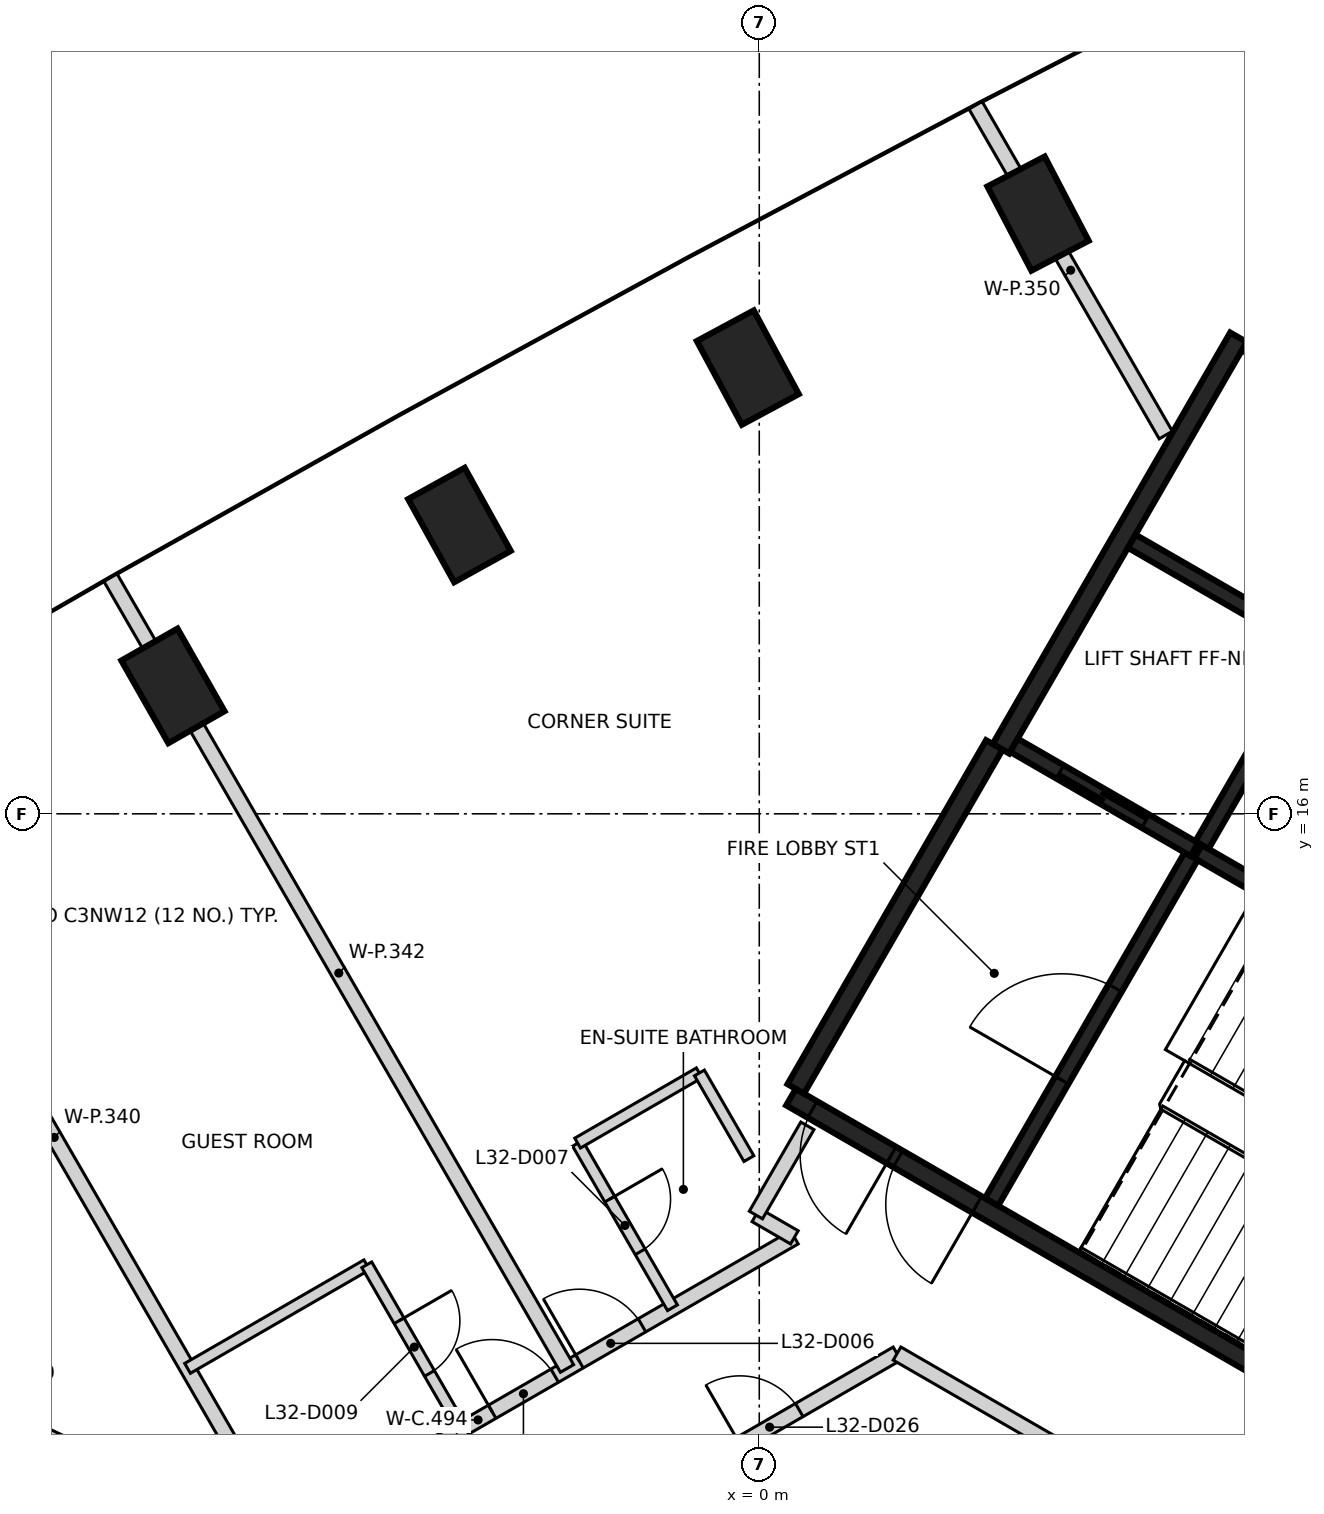
"""IFC4 building model, lengths in metres.
Left out: names, types, materials, properties, quantities, classifications, styles, units other than length and angle.
Written with IfcOpenShell. Run it as: python <this file> out.ifc"""

import sys

from ifc_helpers import new_model, si_unit, direction, frame, frame_2d, origin, origin_2d, place, context, subcontext, project, spatial, rectangle, extrude, element, fill, save


model = new_model("IFC4")
c1 = context("Model", 3, precision=1e-05, world=origin(), true_north=direction((0.0, 1.0)))
c2 = subcontext(c1, "Body", "Model", "MODEL_VIEW")
j1 = project(units=[si_unit("LENGTHUNIT", "METRE"), si_unit("PLANEANGLEUNIT", "RADIAN")], contexts=[c1])
p1 = place(None, origin())
s1 = spatial("IfcSite", under=j1, at=p1, CompositionType="ELEMENT")
p2 = place(p1, origin())
s2 = spatial("IfcBuilding", under=s1, at=p2, CompositionType="ELEMENT")
p3 = place(p2, frame((0.0, 0.0, 132.4)))
s3 = spatial("IfcBuildingStorey", under=s2, at=p3, CompositionType="ELEMENT", Elevation=132.4)
for number, where, z_axis, x_axis in (
    (1, (3.667, 23.896, -0.4), (0.0, 0.0, 1.0), (-0.463, 0.886, 0.0)),
    (2, (-0.151, 21.871, -0.4), (0.0, 0.0, 1.0), (-0.474, 0.881, 0.0)),
    (3, (-3.945, 19.8, -0.4), (0.0, 0.0, 1.0), (-0.485, 0.875, 0.0)),
    (4, (-7.714, 17.683, -0.4), (0.0, 0.0, 1.0), (-0.495, 0.869, 0.0)),
):
    element("IfcColumn", number, at=place(p3, frame(where, z_axis=z_axis, x_axis=x_axis)), inside=s3, PredefinedType="COLUMN", context=c2, shape_type="SweptSolid", body=[
        extrude(rectangle(XDim=1.25, YDim=0.85, at=origin_2d()), origin(), (0.0, 0.0, 1.0), 3.6),
    ])
p4 = place(p3, frame((10.42, 6.498, 0.0), z_axis=(0.0, 0.0, 1.0), x_axis=(-0.866021906294, 0.500006057782, 0.0)))
e5 = element("IfcWall", 5, at=p4, inside=s3, PredefinedType="SHEAR", context=c2, shape_type="SweptSolid", body=[
    extrude(rectangle(XDim=11.55, YDim=0.25, at=frame_2d((5.775, 0.0))), origin(), (0.0, 0.0, 1.0), 3.2),
])
p5 = place(p4, frame((10.025, 0.0, 0.0)))
e6 = element("IfcOpeningElement", 6, at=p5, cuts=e5, PredefinedType="OPENING", context=c2, shape_type="SweptSolid", body=[
    extrude(rectangle(XDim=1.2, YDim=2.1, at=frame_2d((0.6, 1.05))), frame((0.0, 0.135, 0.0), z_axis=(0.0, -1.0, 0.0), x_axis=(1.0, 0.0, 0.0)), (0.0, 0.0, 1.0), 0.27),
])
p6 = place(p4, frame((8.725, 0.0, 0.0)))
e7 = element("IfcOpeningElement", 7, at=p6, cuts=e5, PredefinedType="OPENING", context=c2, shape_type="SweptSolid", body=[
    extrude(rectangle(XDim=1.2, YDim=2.1, at=frame_2d((0.6, 1.05))), frame((0.0, 0.135, 0.0), z_axis=(0.0, -1.0, 0.0), x_axis=(1.0, 0.0, 0.0)), (0.0, 0.0, 1.0), 0.27),
])
p7 = place(p3, frame((3.179, 16.856, 0.0), z_axis=(0.0, 0.0, 1.0), x_axis=(0.500004234368, 0.866022959057, 0.0)))
e8 = element("IfcWall", 8, at=p7, inside=s3, PredefinedType="SHEAR", context=c2, shape_type="SweptSolid", body=[
    extrude(rectangle(XDim=6.25, YDim=0.25, at=frame_2d((3.125, 0.0))), origin(), (0.0, 0.0, 1.0), 3.2),
])
p8 = place(p3, frame((0.48, 12.381, 0.0), z_axis=(0.0, 0.0, 1.0), x_axis=(0.49999885962, 0.866026062182, 0.0)))
e9 = element("IfcWall", 9, at=p8, inside=s3, PredefinedType="SHEAR", context=c2, shape_type="SweptSolid", body=[
    extrude(rectangle(XDim=5.225, YDim=0.25, at=frame_2d((2.612, 0.0))), origin(), (0.0, 0.0, 1.0), 3.2),
])
p9 = place(p3, frame((6.413, 22.206, 0.0), z_axis=(0.0, 0.0, 1.0), x_axis=(0.866016279763, -0.500015802937, 0.0)))
e10 = element("IfcWall", 10, at=p9, inside=s3, PredefinedType="SHEAR", context=c2, shape_type="SweptSolid", body=[
    extrude(rectangle(XDim=1.849, YDim=0.25, at=frame_2d((0.925, 0.0))), origin(), (0.0, 0.0, 1.0), 3.2),
])
p10 = place(p3, frame((5.775, 15.502, 0.0), z_axis=(0.0, 0.0, 1.0), x_axis=(0.866020080793, -0.500009219579, 0.0)))
e11 = element("IfcWall", 11, at=p10, inside=s3, PredefinedType="SHEAR", context=c2, shape_type="SweptSolid", body=[
    extrude(rectangle(XDim=5.699, YDim=0.2, at=frame_2d((2.85, 0.0))), origin(), (0.0, 0.0, 1.0), 3.2),
])
p11 = place(p3, frame((3.057, 10.895, 0.0), z_axis=(0.0, 0.0, 1.0), x_axis=(0.499989418164, 0.866031513124, 0.0)))
e12 = element("IfcWall", 12, at=p11, inside=s3, PredefinedType="SHEAR", context=c2, shape_type="SweptSolid", body=[
    extrude(rectangle(XDim=5.251, YDim=0.2, at=frame_2d((2.625, 0.0))), origin(), (0.0, 0.0, 1.0), 3.2),
])
p12 = place(p11, frame((1.849, 0.0, 0.0)))
e13 = element("IfcOpeningElement", 13, at=p12, cuts=e12, PredefinedType="OPENING", context=c2, shape_type="SweptSolid", body=[
    extrude(rectangle(XDim=1.4, YDim=2.1, at=frame_2d((0.7, 1.05))), frame((0.0, 0.11, 0.0), z_axis=(0.0, -1.0, 0.0), x_axis=(1.0, 0.0, 0.0)), (0.0, 0.0, 1.0), 0.22),
])
p13 = place(p3, frame((7.199, 17.97, 0.0), z_axis=(0.0, 0.0, 1.0), x_axis=(-0.499968400327, -0.866043647095, 0.0)))
e14 = element("IfcWall", 14, at=p13, inside=s3, PredefinedType="SHEAR", context=c2, shape_type="SweptSolid", body=[
    extrude(rectangle(XDim=2.75, YDim=0.2, at=frame_2d((1.375, 0.0))), origin(), (0.0, 0.0, 1.0), 3.2),
])
p14 = place(p3, frame((5.725, 15.531, 0.0), z_axis=(0.0, 0.0, 1.0), x_axis=(-0.866037306777, 0.499979382845, 0.0)))
e15 = element("IfcWall", 15, at=p14, inside=s3, PredefinedType="SHEAR", context=c2, shape_type="SweptSolid", body=[
    extrude(rectangle(XDim=2.742, YDim=0.2, at=frame_2d((1.371, 0.0))), origin(), (0.0, 0.0, 1.0), 3.2),
])
p15 = place(p14, frame((0.743, 0.0, 0.0)))
e16 = element("IfcOpeningElement", 16, at=p15, cuts=e15, PredefinedType="OPENING", context=c2, shape_type="SweptSolid", body=[
    extrude(rectangle(XDim=1.3, YDim=2.1, at=frame_2d((0.65, 1.05))), frame((0.0, 0.11, 0.0), z_axis=(0.0, -1.0, 0.0), x_axis=(1.0, 0.0, 0.0)), (0.0, 0.0, 1.0), 0.22),
])
p16 = place(p3, frame((4.901, 19.586, 0.0), z_axis=(0.0, 0.0, 1.0), x_axis=(0.866022890907, -0.500004352405, 0.0)))
e17 = element("IfcWall", 17, at=p16, inside=s3, PredefinedType="SHEAR", context=c2, shape_type="SweptSolid", body=[
    extrude(rectangle(XDim=2.799, YDim=0.2, at=frame_2d((1.399, 0.0))), origin(), (0.0, 0.0, 1.0), 3.2),
])
p17 = place(p3, frame((-10.141, 8.176, 0.0), z_axis=(0.0, 0.0, 1.0), x_axis=(0.903904169039, -0.427735026849, 0.0)))
e18 = element("IfcWall", 18, at=p17, inside=s3, PredefinedType="PARTITIONING", context=c2, shape_type="SweptSolid", body=[
    extrude(rectangle(XDim=1.225, YDim=0.2, at=frame_2d((0.612, 0.0))), origin(), (0.0, 0.0, 1.0), 3.2),
])
p18 = place(p3, frame((-8.613, 2.881, 0.0), z_axis=(0.0, 0.0, 1.0), x_axis=(0.866103179807, 0.499865263774, 0.0)))
e19 = element("IfcWall", 19, at=p18, inside=s3, PredefinedType="PARTITIONING", context=c2, shape_type="SweptSolid", body=[
    extrude(rectangle(XDim=12.036, YDim=0.2, at=frame_2d((6.018, 0.0))), origin(), (0.0, 0.0, 1.0), 3.2),
])
p19 = place(p18, frame((9.652, 0.0, 0.0)))
e20 = element("IfcOpeningElement", 20, at=p19, cuts=e19, PredefinedType="OPENING", context=c2, shape_type="SweptSolid", body=[
    extrude(rectangle(XDim=0.9, YDim=2.1, at=frame_2d((0.45, 1.05))), frame((0.0, 0.11, 0.0), z_axis=(0.0, -1.0, 0.0), x_axis=(1.0, 0.0, 0.0)), (0.0, 0.0, 1.0), 0.22),
])
p20 = place(p18, frame((3.646, 0.0, 0.0)))
e21 = element("IfcOpeningElement", 21, at=p20, cuts=e19, PredefinedType="OPENING", context=c2, shape_type="SweptSolid", body=[
    extrude(rectangle(XDim=0.9, YDim=2.1, at=frame_2d((0.45, 1.05))), frame((0.0, 0.11, 0.0), z_axis=(0.0, -1.0, 0.0), x_axis=(1.0, 0.0, 0.0)), (0.0, 0.0, 1.0), 0.22),
])
p21 = place(p3, frame((-7.862, 5.624, 0.0), z_axis=(0.0, 0.0, 1.0), x_axis=(0.866109024618, 0.499855136491, 0.0)))
e22 = element("IfcWall", 22, at=p21, inside=s3, PredefinedType="PARTITIONING", context=c2, shape_type="SweptSolid", body=[
    extrude(rectangle(XDim=9.61, YDim=0.2, at=frame_2d((4.805, 0.0))), origin(), (0.0, 0.0, 1.0), 3.2),
])
p22 = place(p21, frame((6.345, 0.0, 0.0)))
e23 = element("IfcOpeningElement", 23, at=p22, cuts=e22, PredefinedType="OPENING", context=c2, shape_type="SweptSolid", body=[
    extrude(rectangle(XDim=0.95, YDim=2.1, at=frame_2d((0.475, 1.05))), frame((0.0, 0.11, 0.0), z_axis=(0.0, -1.0, 0.0), x_axis=(1.0, 0.0, 0.0)), (0.0, 0.0, 1.0), 0.22),
])
p23 = place(p21, frame((5.02, 0.0, 0.0)))
e24 = element("IfcOpeningElement", 24, at=p23, cuts=e22, PredefinedType="OPENING", context=c2, shape_type="SweptSolid", body=[
    extrude(rectangle(XDim=0.95, YDim=2.1, at=frame_2d((0.475, 1.05))), frame((0.0, 0.11, 0.0), z_axis=(0.0, -1.0, 0.0), x_axis=(1.0, 0.0, 0.0)), (0.0, 0.0, 1.0), 0.22),
])
p24 = place(p3, frame((-0.045, 10.721, 0.0), z_axis=(0.0, 0.0, 1.0), x_axis=(0.865768710998, -0.500444341617, 0.0)))
e25 = element("IfcWall", 25, at=p24, inside=s3, PredefinedType="PARTITIONING", context=c2, shape_type="SweptSolid", body=[
    extrude(rectangle(XDim=0.585, YDim=0.2, at=frame_2d((0.293, 0.0))), origin(), (0.0, 0.0, 1.0), 3.2),
])
p25 = place(p3, frame((-0.044, 10.722, 0.0), z_axis=(0.0, 0.0, 1.0), x_axis=(0.500034408226, 0.866005537274, 0.0)))
e26 = element("IfcWall", 26, at=p25, inside=s3, PredefinedType="PARTITIONING", context=c2, shape_type="SweptSolid", body=[
    extrude(rectangle(XDim=1.355, YDim=0.2, at=frame_2d((0.677, 0.0))), origin(), (0.0, 0.0, 1.0), 3.2),
])
p26 = place(p3, frame((1.813, 8.899, 0.0), z_axis=(0.0, 0.0, 1.0), x_axis=(0.865957732194, -0.50011719232, 0.0)))
e27 = element("IfcWall", 27, at=p26, inside=s3, PredefinedType="PARTITIONING", context=c2, shape_type="SweptSolid", body=[
    extrude(rectangle(XDim=2.891, YDim=0.2, at=frame_2d((1.445, 0.0))), origin(), (0.0, 0.0, 1.0), 2.3),
])
p27 = place(p3, frame((-12.279, 16.946, 0.0), z_axis=(0.0, 0.0, 1.0), x_axis=(0.499902454835, -0.866081714187, 0.0)))
e28 = element("IfcWall", 28, at=p27, inside=s3, PredefinedType="PARTITIONING", context=c2, shape_type="SweptSolid", body=[
    extrude(rectangle(XDim=12.015, YDim=0.2, at=frame_2d((6.008, 0.0))), origin(), (0.0, 0.0, 1.0), 3.2),
])
p28 = place(p3, frame((-8.535, 19.107, 0.0), z_axis=(0.0, 0.0, 1.0), x_axis=(0.499972843048, -0.86604108229, 0.0)))
e29 = element("IfcWall", 29, at=p28, inside=s3, PredefinedType="PARTITIONING", context=c2, shape_type="SweptSolid", body=[
    extrude(rectangle(XDim=12.013, YDim=0.2, at=frame_2d((6.007, 0.0))), origin(), (0.0, 0.0, 1.0), 3.2),
])
p29 = place(p3, frame((2.845, 25.321, 0.0), z_axis=(0.0, 0.0, 1.0), x_axis=(0.499730893997, -0.86618071647, 0.0)))
e30 = element("IfcWall", 30, at=p29, inside=s3, PredefinedType="PARTITIONING", context=c2, shape_type="SweptSolid", body=[
    extrude(rectangle(XDim=5.008, YDim=0.2, at=frame_2d((2.504, 0.0))), origin(), (0.0, 0.0, 1.0), 3.2),
])
p30 = place(p3, frame((-7.522, 8.704, 0.0), z_axis=(0.0, 0.0, 1.0), x_axis=(0.865972067821, 0.500092369221, 0.0)))
e31 = element("IfcWall", 31, at=p30, inside=s3, PredefinedType="PARTITIONING", context=c2, shape_type="SweptSolid", body=[
    extrude(rectangle(XDim=2.723, YDim=0.15, at=frame_2d((1.362, 0.0))), origin(), (0.0, 0.0, 1.0), 3.2),
])
p31 = place(p3, frame((-5.164, 10.067, 0.0), z_axis=(0.0, 0.0, 1.0), x_axis=(0.500046524342, -0.865998541277, 0.0)))
e32 = element("IfcWall", 32, at=p31, inside=s3, PredefinedType="PARTITIONING", context=c2, shape_type="SweptSolid", body=[
    extrude(rectangle(XDim=2.5, YDim=0.15, at=frame_2d((1.25, 0.0))), origin(), (0.0, 0.0, 1.0), 3.2),
])
p32 = place(p31, frame((0.85, 0.0, 0.0)))
e33 = element("IfcOpeningElement", 33, at=p32, cuts=e32, PredefinedType="OPENING", context=c2, shape_type="SweptSolid", body=[
    extrude(rectangle(XDim=0.8, YDim=2.1, at=frame_2d((0.4, 1.05))), frame((0.0, 0.085, 0.0), z_axis=(0.0, -1.0, 0.0), x_axis=(1.0, 0.0, 0.0)), (0.0, 0.0, 1.0), 0.17),
])
p33 = place(p3, frame((-2.391, 11.665, 0.0), z_axis=(0.0, 0.0, 1.0), x_axis=(0.500049599607, -0.865996765544, 0.0)))
e34 = element("IfcWall", 34, at=p33, inside=s3, PredefinedType="PARTITIONING", context=c2, shape_type="SweptSolid", body=[
    extrude(rectangle(XDim=2.498, YDim=0.15, at=frame_2d((1.249, 0.0))), origin(), (0.0, 0.0, 1.0), 3.2),
])
p34 = place(p33, frame((0.848, 0.0, 0.0)))
e35 = element("IfcOpeningElement", 35, at=p34, cuts=e34, PredefinedType="OPENING", context=c2, shape_type="SweptSolid", body=[
    extrude(rectangle(XDim=0.8, YDim=2.1, at=frame_2d((0.4, 1.05))), frame((0.0, 0.085, 0.0), z_axis=(0.0, -1.0, 0.0), x_axis=(1.0, 0.0, 0.0)), (0.0, 0.0, 1.0), 0.17),
])
p35 = place(p3, frame((-2.39, 11.668, 0.0), z_axis=(0.0, 0.0, 1.0), x_axis=(0.865932482239, 0.500160910312, 0.0)))
e36 = element("IfcWall", 36, at=p35, inside=s3, PredefinedType="PARTITIONING", context=c2, shape_type="SweptSolid", body=[
    extrude(rectangle(XDim=1.848, YDim=0.15, at=frame_2d((0.924, 0.0))), origin(), (0.0, 0.0, 1.0), 3.2),
])
p36 = place(p3, frame((-0.787, 12.591, 0.0), z_axis=(0.0, 0.0, 1.0), x_axis=(0.499749509877, -0.866169976031, 0.0)))
e37 = element("IfcWall", 37, at=p36, inside=s3, PredefinedType="PARTITIONING", context=c2, shape_type="SweptSolid", body=[
    extrude(rectangle(XDim=1.302, YDim=0.15, at=frame_2d((0.651, 0.0))), origin(), (0.0, 0.0, 1.0), 3.2),
])
p37 = place(p15, origin())
e38 = element("IfcDoor", 38, at=p37, inside=s3, OperationType="SLIDING_TO_RIGHT", PredefinedType="DOOR", context=c2, shape_type="SweptSolid", body=[
    extrude(rectangle(XDim=1.3, YDim=2.1, at=frame_2d((0.65, 1.05))), frame((0.0, 0.025, 0.0), z_axis=(0.0, -1.0, 0.0), x_axis=(1.0, 0.0, 0.0)), (0.0, 0.0, 1.0), 0.05),
])
fill(e16, e38)
p38 = place(p5, origin())
e39 = element("IfcDoor", 39, at=p38, inside=s3, OperationType="SINGLE_SWING_LEFT", PredefinedType="DOOR", context=c2, shape_type="SweptSolid", body=[
    extrude(rectangle(XDim=1.2, YDim=2.1, at=frame_2d((0.6, 1.05))), frame((0.0, 0.025, 0.0), z_axis=(0.0, -1.0, 0.0), x_axis=(1.0, 0.0, 0.0)), (0.0, 0.0, 1.0), 0.05),
])
fill(e6, e39)
p39 = place(p6, origin())
e40 = element("IfcDoor", 40, at=p39, inside=s3, OperationType="SINGLE_SWING_RIGHT", PredefinedType="DOOR", context=c2, shape_type="SweptSolid", body=[
    extrude(rectangle(XDim=1.2, YDim=2.1, at=frame_2d((0.6, 1.05))), frame((0.0, 0.025, 0.0), z_axis=(0.0, -1.0, 0.0), x_axis=(1.0, 0.0, 0.0)), (0.0, 0.0, 1.0), 0.05),
])
fill(e7, e40)
p40 = place(p12, origin())
e41 = element("IfcDoor", 41, at=p40, inside=s3, OperationType="SINGLE_SWING_RIGHT", PredefinedType="DOOR", context=c2, shape_type="SweptSolid", body=[
    extrude(rectangle(XDim=1.4, YDim=2.1, at=frame_2d((0.7, 1.05))), frame((0.0, 0.025, 0.0), z_axis=(0.0, -1.0, 0.0), x_axis=(1.0, 0.0, 0.0)), (0.0, 0.0, 1.0), 0.05),
])
fill(e13, e41)
p41 = place(p22, origin())
e42 = element("IfcDoor", 42, at=p41, inside=s3, OperationType="SINGLE_SWING_LEFT", PredefinedType="DOOR", context=c2, shape_type="SweptSolid", body=[
    extrude(rectangle(XDim=0.95, YDim=2.1, at=frame_2d((0.475, 1.05))), frame((0.0, 0.025, 0.0), z_axis=(0.0, -1.0, 0.0), x_axis=(1.0, 0.0, 0.0)), (0.0, 0.0, 1.0), 0.05),
])
fill(e23, e42)
p42 = place(p34, origin())
e43 = element("IfcDoor", 43, at=p42, inside=s3, OperationType="SINGLE_SWING_LEFT", PredefinedType="DOOR", context=c2, shape_type="SweptSolid", body=[
    extrude(rectangle(XDim=0.8, YDim=2.1, at=frame_2d((0.4, 1.05))), frame((0.0, 0.025, 0.0), z_axis=(0.0, -1.0, 0.0), x_axis=(1.0, 0.0, 0.0)), (0.0, 0.0, 1.0), 0.05),
])
fill(e35, e43)
p43 = place(p23, origin())
e44 = element("IfcDoor", 44, at=p43, inside=s3, OperationType="SINGLE_SWING_LEFT", PredefinedType="DOOR", context=c2, shape_type="SweptSolid", body=[
    extrude(rectangle(XDim=0.95, YDim=2.1, at=frame_2d((0.475, 1.05))), frame((0.0, 0.025, 0.0), z_axis=(0.0, -1.0, 0.0), x_axis=(1.0, 0.0, 0.0)), (0.0, 0.0, 1.0), 0.05),
])
fill(e24, e44)
p44 = place(p32, frame((0.8, 0.0, 0.0), z_axis=(0.0, 0.0, 1.0), x_axis=(-1.0, 0.0, 0.0)))
e45 = element("IfcDoor", 45, at=p44, inside=s3, OperationType="SINGLE_SWING_LEFT", PredefinedType="DOOR", context=c2, shape_type="SweptSolid", body=[
    extrude(rectangle(XDim=0.8, YDim=2.1, at=frame_2d((0.4, 1.05))), frame((0.0, 0.025, 0.0), z_axis=(0.0, -1.0, 0.0), x_axis=(1.0, 0.0, 0.0)), (0.0, 0.0, 1.0), 0.05),
])
fill(e33, e45)
p45 = place(p19, frame((0.9, 0.0, 0.0), z_axis=(0.0, 0.0, 1.0), x_axis=(-1.0, 0.0, 0.0)))
e46 = element("IfcDoor", 46, at=p45, inside=s3, OperationType="SINGLE_SWING_LEFT", PredefinedType="DOOR", context=c2, shape_type="SweptSolid", body=[
    extrude(rectangle(XDim=0.9, YDim=2.1, at=frame_2d((0.45, 1.05))), frame((0.0, 0.025, 0.0), z_axis=(0.0, -1.0, 0.0), x_axis=(1.0, 0.0, 0.0)), (0.0, 0.0, 1.0), 0.05),
])
fill(e20, e46)
save(model, sys.argv[1])
